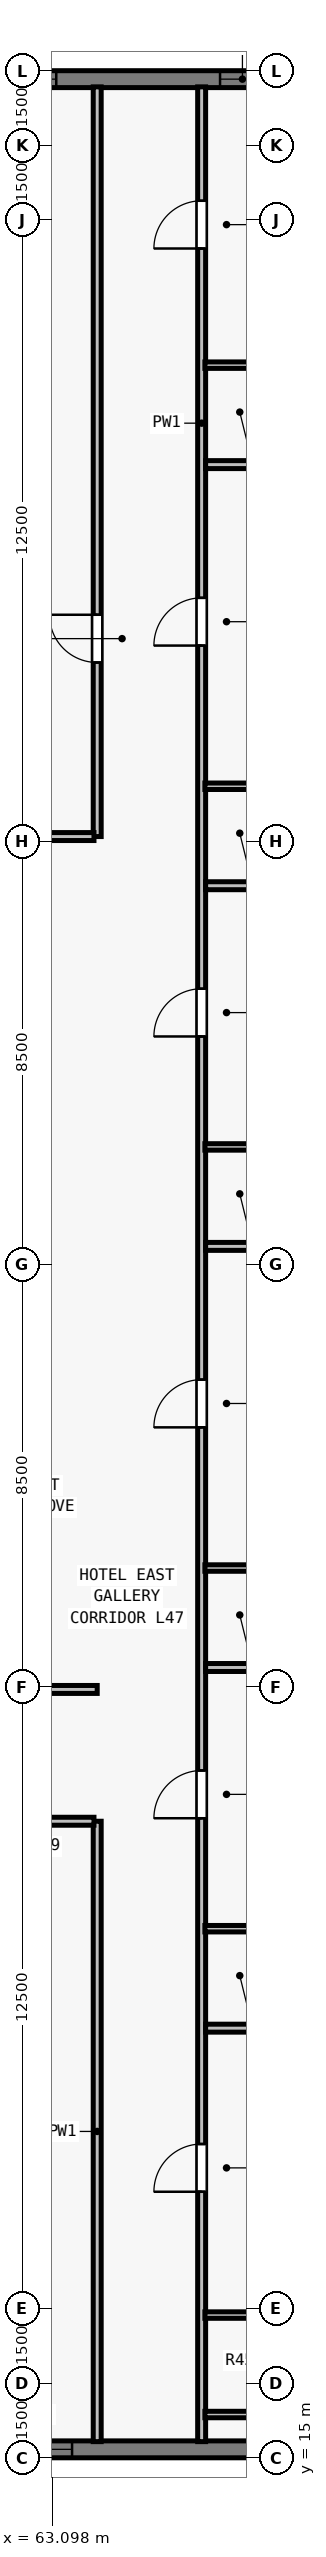
"""IFC4 building model, lengths in metres.
Left out: names, types, materials, properties, quantities, classifications, styles, units other than length and angle.
Written with IfcOpenShell. Run it as: python <this file> out.ifc"""

import sys

from ifc_helpers import new_model, si_unit, direction, frame, frame_2d, origin, place, context, subcontext, project, spatial, rectangle, extrude, element, fill, save


model = new_model("IFC4")
c1 = context("Model", 3, precision=1e-05, world=origin(), true_north=direction((0.0, 1.0)))
c2 = subcontext(c1, "Body", "Model", "MODEL_VIEW")
j1 = project(units=[si_unit("LENGTHUNIT", "METRE"), si_unit("PLANEANGLEUNIT", "RADIAN")], contexts=[c1])
p1 = place(None, origin())
s1 = spatial("IfcSite", under=j1, at=p1, CompositionType="ELEMENT")
p2 = place(p1, origin())
s2 = spatial("IfcBuilding", under=s1, at=p2, CompositionType="ELEMENT")
p3 = place(p2, frame((0.0, 0.0, 172.5)))
s3 = spatial("IfcBuildingStorey", under=s2, at=p3, CompositionType="ELEMENT", Elevation=172.5)
p4 = place(p3, frame((72.0, 15.17, 0.0), z_axis=(0.0, 0.0, 1.0), x_axis=(-1.0, 0.0, 0.0)))
e1 = element("IfcWall", 1, at=p4, inside=s3, PredefinedType="SOLIDWALL", context=c2, shape_type="SweptSolid", body=[
    extrude(rectangle(XDim=39.682, YDim=0.34, at=frame_2d((19.841, 0.0))), origin(), (0.0, 0.0, 1.0), 3.28),
])
p5 = place(p4, frame((8.505, 0.0, 0.8)))
e2 = element("IfcOpeningElement", 2, at=p5, cuts=e1, PredefinedType="OPENING", context=c2, shape_type="SweptSolid", body=[
    extrude(rectangle(XDim=1.35, YDim=1.66, at=frame_2d((0.675, 0.83))), frame((0.0, 0.18, 0.0), z_axis=(0.0, -1.0, 0.0), x_axis=(1.0, 0.0, 0.0)), (0.0, 0.0, 1.0), 0.36),
])
p6 = place(p4, frame((11.859, 0.0, 0.8)))
e3 = element("IfcOpeningElement", 3, at=p6, cuts=e1, PredefinedType="OPENING", context=c2, shape_type="SweptSolid", body=[
    extrude(rectangle(XDim=1.75, YDim=1.66, at=frame_2d((0.875, 0.83))), frame((0.0, 0.18, 0.0), z_axis=(0.0, -1.0, 0.0), x_axis=(1.0, 0.0, 0.0)), (0.0, 0.0, 1.0), 0.36),
])
p7 = place(p4, frame((16.062, 0.0, 0.8)))
e4 = element("IfcOpeningElement", 4, at=p7, cuts=e1, PredefinedType="OPENING", context=c2, shape_type="SweptSolid", body=[
    extrude(rectangle(XDim=1.35, YDim=1.66, at=frame_2d((0.675, 0.83))), frame((0.0, 0.18, 0.0), z_axis=(0.0, -1.0, 0.0), x_axis=(1.0, 0.0, 0.0)), (0.0, 0.0, 1.0), 0.36),
])
p8 = place(p4, frame((18.966, 0.0, 0.8)))
e5 = element("IfcOpeningElement", 5, at=p8, cuts=e1, PredefinedType="OPENING", context=c2, shape_type="SweptSolid", body=[
    extrude(rectangle(XDim=1.75, YDim=1.66, at=frame_2d((0.875, 0.83))), frame((0.0, 0.18, 0.0), z_axis=(0.0, -1.0, 0.0), x_axis=(1.0, 0.0, 0.0)), (0.0, 0.0, 1.0), 0.36),
])
p9 = place(p4, frame((21.469, 0.0, 0.8)))
e6 = element("IfcOpeningElement", 6, at=p9, cuts=e1, PredefinedType="OPENING", context=c2, shape_type="SweptSolid", body=[
    extrude(rectangle(XDim=1.35, YDim=1.66, at=frame_2d((0.675, 0.83))), frame((0.0, 0.18, 0.0), z_axis=(0.0, -1.0, 0.0), x_axis=(1.0, 0.0, 0.0)), (0.0, 0.0, 1.0), 0.36),
])
p10 = place(p4, frame((26.073, 0.0, 0.8)))
e7 = element("IfcOpeningElement", 7, at=p10, cuts=e1, PredefinedType="OPENING", context=c2, shape_type="SweptSolid", body=[
    extrude(rectangle(XDim=1.75, YDim=1.66, at=frame_2d((0.875, 0.83))), frame((0.0, 0.18, 0.0), z_axis=(0.0, -1.0, 0.0), x_axis=(1.0, 0.0, 0.0)), (0.0, 0.0, 1.0), 0.36),
])
p11 = place(p4, frame((32.71, 0.0, 0.8)))
e8 = element("IfcOpeningElement", 8, at=p11, cuts=e1, PredefinedType="OPENING", context=c2, shape_type="SweptSolid", body=[
    extrude(rectangle(XDim=0.9, YDim=1.66, at=frame_2d((0.45, 0.83))), frame((0.0, 0.18, 0.0), z_axis=(0.0, -1.0, 0.0), x_axis=(1.0, 0.0, 0.0)), (0.0, 0.0, 1.0), 0.36),
])
p12 = place(p3, frame((32.0, 62.83, 0.0), z_axis=(0.0, 0.0, 1.0), x_axis=(1.0, 0.0, 0.0)))
e9 = element("IfcWall", 9, at=p12, inside=s3, PredefinedType="SOLIDWALL", context=c2, shape_type="SweptSolid", body=[
    extrude(rectangle(XDim=39.682, YDim=0.34, at=frame_2d((19.841, 0.0))), origin(), (0.0, 0.0, 1.0), 3.28),
])
p13 = place(p12, frame((4.752, 0.0, 0.8)))
e10 = element("IfcOpeningElement", 10, at=p13, cuts=e9, PredefinedType="OPENING", context=c2, shape_type="SweptSolid", body=[
    extrude(rectangle(XDim=1.75, YDim=1.66, at=frame_2d((0.875, 0.83))), frame((0.0, 0.18, 0.0), z_axis=(0.0, -1.0, 0.0), x_axis=(1.0, 0.0, 0.0)), (0.0, 0.0, 1.0), 0.36),
])
p14 = place(p12, frame((8.055, 0.0, 0.8)))
e11 = element("IfcOpeningElement", 11, at=p14, cuts=e9, PredefinedType="OPENING", context=c2, shape_type="SweptSolid", body=[
    extrude(rectangle(XDim=1.35, YDim=1.66, at=frame_2d((0.675, 0.83))), frame((0.0, 0.18, 0.0), z_axis=(0.0, -1.0, 0.0), x_axis=(1.0, 0.0, 0.0)), (0.0, 0.0, 1.0), 0.36),
])
p15 = place(p12, frame((11.859, 0.0, 0.8)))
e12 = element("IfcOpeningElement", 12, at=p15, cuts=e9, PredefinedType="OPENING", context=c2, shape_type="SweptSolid", body=[
    extrude(rectangle(XDim=1.75, YDim=1.66, at=frame_2d((0.875, 0.83))), frame((0.0, 0.18, 0.0), z_axis=(0.0, -1.0, 0.0), x_axis=(1.0, 0.0, 0.0)), (0.0, 0.0, 1.0), 0.36),
])
p16 = place(p12, frame((18.966, 0.0, 0.8)))
e13 = element("IfcOpeningElement", 13, at=p16, cuts=e9, PredefinedType="OPENING", context=c2, shape_type="SweptSolid", body=[
    extrude(rectangle(XDim=1.75, YDim=1.66, at=frame_2d((0.875, 0.83))), frame((0.0, 0.18, 0.0), z_axis=(0.0, -1.0, 0.0), x_axis=(1.0, 0.0, 0.0)), (0.0, 0.0, 1.0), 0.36),
])
p17 = place(p12, frame((21.469, 0.0, 0.8)))
e14 = element("IfcOpeningElement", 14, at=p17, cuts=e9, PredefinedType="OPENING", context=c2, shape_type="SweptSolid", body=[
    extrude(rectangle(XDim=1.35, YDim=1.66, at=frame_2d((0.675, 0.83))), frame((0.0, 0.18, 0.0), z_axis=(0.0, -1.0, 0.0), x_axis=(1.0, 0.0, 0.0)), (0.0, 0.0, 1.0), 0.36),
])
p18 = place(p12, frame((26.073, 0.0, 0.8)))
e15 = element("IfcOpeningElement", 15, at=p18, cuts=e9, PredefinedType="OPENING", context=c2, shape_type="SweptSolid", body=[
    extrude(rectangle(XDim=1.75, YDim=1.66, at=frame_2d((0.875, 0.83))), frame((0.0, 0.18, 0.0), z_axis=(0.0, -1.0, 0.0), x_axis=(1.0, 0.0, 0.0)), (0.0, 0.0, 1.0), 0.36),
])
p19 = place(p12, frame((29.827, 0.0, 0.8)))
e16 = element("IfcOpeningElement", 16, at=p19, cuts=e9, PredefinedType="OPENING", context=c2, shape_type="SweptSolid", body=[
    extrude(rectangle(XDim=1.35, YDim=1.66, at=frame_2d((0.675, 0.83))), frame((0.0, 0.18, 0.0), z_axis=(0.0, -1.0, 0.0), x_axis=(1.0, 0.0, 0.0)), (0.0, 0.0, 1.0), 0.36),
])
p20 = place(p12, frame((34.47, 0.0, 0.8)))
e17 = element("IfcOpeningElement", 17, at=p20, cuts=e9, PredefinedType="OPENING", context=c2, shape_type="SweptSolid", body=[
    extrude(rectangle(XDim=0.9, YDim=1.66, at=frame_2d((0.45, 0.83))), frame((0.0, 0.18, 0.0), z_axis=(0.0, -1.0, 0.0), x_axis=(1.0, 0.0, 0.0)), (0.0, 0.0, 1.0), 0.36),
])
p21 = place(p3, frame((66.1, 15.325, 0.0), z_axis=(0.0, 0.0, 1.0), x_axis=(0.0, 1.0, 0.0)))
e18 = element("IfcWall", 18, at=p21, inside=s3, PredefinedType="PARTITIONING", context=c2, shape_type="SweptSolid", body=[
    extrude(rectangle(XDim=47.35, YDim=0.16, at=frame_2d((23.675, 0.0))), origin(), (0.0, 0.0, 1.0), 2.555),
])
p22 = place(p21, frame((5.025, 0.0, 0.0)))
e19 = element("IfcOpeningElement", 19, at=p22, cuts=e18, PredefinedType="OPENING", context=c2, shape_type="SweptSolid", body=[
    extrude(rectangle(XDim=0.96, YDim=2.15, at=frame_2d((0.48, 1.075))), frame((0.0, 0.09, 0.0), z_axis=(0.0, -1.0, 0.0), x_axis=(1.0, 0.0, 0.0)), (0.0, 0.0, 1.0), 0.18),
])
p23 = place(p21, frame((12.535, 0.0, 0.0)))
e20 = element("IfcOpeningElement", 20, at=p23, cuts=e18, PredefinedType="OPENING", context=c2, shape_type="SweptSolid", body=[
    extrude(rectangle(XDim=0.96, YDim=2.15, at=frame_2d((0.48, 1.075))), frame((0.0, 0.09, 0.0), z_axis=(0.0, -1.0, 0.0), x_axis=(1.0, 0.0, 0.0)), (0.0, 0.0, 1.0), 0.18),
])
p24 = place(p21, frame((20.395, 0.0, 0.0)))
e21 = element("IfcOpeningElement", 21, at=p24, cuts=e18, PredefinedType="OPENING", context=c2, shape_type="SweptSolid", body=[
    extrude(rectangle(XDim=0.96, YDim=2.15, at=frame_2d((0.48, 1.075))), frame((0.0, 0.09, 0.0), z_axis=(0.0, -1.0, 0.0), x_axis=(1.0, 0.0, 0.0)), (0.0, 0.0, 1.0), 0.18),
])
p25 = place(p21, frame((28.255, 0.0, 0.0)))
e22 = element("IfcOpeningElement", 22, at=p25, cuts=e18, PredefinedType="OPENING", context=c2, shape_type="SweptSolid", body=[
    extrude(rectangle(XDim=0.96, YDim=2.15, at=frame_2d((0.48, 1.075))), frame((0.0, 0.09, 0.0), z_axis=(0.0, -1.0, 0.0), x_axis=(1.0, 0.0, 0.0)), (0.0, 0.0, 1.0), 0.18),
])
p26 = place(p21, frame((36.115, 0.0, 0.0)))
e23 = element("IfcOpeningElement", 23, at=p26, cuts=e18, PredefinedType="OPENING", context=c2, shape_type="SweptSolid", body=[
    extrude(rectangle(XDim=0.96, YDim=2.15, at=frame_2d((0.48, 1.075))), frame((0.0, 0.09, 0.0), z_axis=(0.0, -1.0, 0.0), x_axis=(1.0, 0.0, 0.0)), (0.0, 0.0, 1.0), 0.18),
])
p27 = place(p21, frame((44.1, 0.0, 0.0)))
e24 = element("IfcOpeningElement", 24, at=p27, cuts=e18, PredefinedType="OPENING", context=c2, shape_type="SweptSolid", body=[
    extrude(rectangle(XDim=0.96, YDim=2.15, at=frame_2d((0.48, 1.075))), frame((0.0, 0.09, 0.0), z_axis=(0.0, -1.0, 0.0), x_axis=(1.0, 0.0, 0.0)), (0.0, 0.0, 1.0), 0.18),
])
p28 = place(p3, frame((64.0, 15.325, 0.0), z_axis=(0.0, 0.0, 1.0), x_axis=(0.0, 1.0, 0.0)))
e25 = element("IfcWall", 25, at=p28, inside=s3, PredefinedType="PARTITIONING", context=c2, shape_type="SweptSolid", body=[
    extrude(rectangle(XDim=12.475, YDim=0.16, at=frame_2d((6.238, 0.0))), origin(), (0.0, 0.0, 1.0), 2.555),
])
p29 = place(p3, frame((64.0, 47.6, 0.0), z_axis=(0.0, 0.0, 1.0), x_axis=(0.0, 1.0, 0.0)))
e26 = element("IfcWall", 26, at=p29, inside=s3, PredefinedType="PARTITIONING", context=c2, shape_type="SweptSolid", body=[
    extrude(rectangle(XDim=15.075, YDim=0.16, at=frame_2d((7.538, 0.0))), origin(), (0.0, 0.0, 1.0), 2.555),
])
p30 = place(p29, frame((3.5, 0.0, 0.0)))
e27 = element("IfcOpeningElement", 27, at=p30, cuts=e26, PredefinedType="OPENING", context=c2, shape_type="SweptSolid", body=[
    extrude(rectangle(XDim=0.96, YDim=2.12, at=frame_2d((0.48, 1.06))), frame((0.0, 0.09, 0.0), z_axis=(0.0, -1.0, 0.0), x_axis=(1.0, 0.0, 0.0)), (0.0, 0.0, 1.0), 0.18),
])
p31 = place(p3, frame((60.765, 30.45, 0.0), z_axis=(0.0, 0.0, 1.0), x_axis=(1.0, 0.0, 0.0)))
e28 = element("IfcWall", 28, at=p31, inside=s3, PredefinedType="PARTITIONING", context=c2, shape_type="SweptSolid", body=[
    extrude(rectangle(XDim=3.235, YDim=0.16, at=frame_2d((1.618, 0.0))), origin(), (0.0, 0.0, 1.0), 3.28),
])
p32 = place(p3, frame((60.765, 47.6, 0.0), z_axis=(0.0, 0.0, 1.0), x_axis=(1.0, 0.0, 0.0)))
e29 = element("IfcWall", 29, at=p32, inside=s3, PredefinedType="PARTITIONING", context=c2, shape_type="SweptSolid", body=[
    extrude(rectangle(XDim=3.17, YDim=0.16, at=frame_2d((1.585, 0.0))), origin(), (0.0, 0.0, 1.0), 3.28),
])
p33 = place(p3, frame((41.865, 27.8, 0.0), z_axis=(0.0, 0.0, 1.0), x_axis=(1.0, 0.0, 0.0)))
e30 = element("IfcWall", 30, at=p33, inside=s3, PredefinedType="PARTITIONING", context=c2, shape_type="SweptSolid", body=[
    extrude(rectangle(XDim=22.07, YDim=0.16, at=frame_2d((11.035, 0.0))), origin(), (0.0, 0.0, 1.0), 3.28),
])
p34 = place(p33, frame((4.232, 0.0, 0.0)))
e31 = element("IfcOpeningElement", 31, at=p34, cuts=e30, PredefinedType="OPENING", context=c2, shape_type="SweptSolid", body=[
    extrude(rectangle(XDim=0.96, YDim=2.15, at=frame_2d((0.48, 1.075))), frame((0.0, 0.09, 0.0), z_axis=(0.0, -1.0, 0.0), x_axis=(1.0, 0.0, 0.0)), (0.0, 0.0, 1.0), 0.18),
])
p35 = place(p33, frame((11.545, 0.0, 0.0)))
e32 = element("IfcOpeningElement", 32, at=p35, cuts=e30, PredefinedType="OPENING", context=c2, shape_type="SweptSolid", body=[
    extrude(rectangle(XDim=0.96, YDim=2.15, at=frame_2d((0.48, 1.075))), frame((0.0, 0.09, 0.0), z_axis=(0.0, -1.0, 0.0), x_axis=(1.0, 0.0, 0.0)), (0.0, 0.0, 1.0), 0.18),
])
p36 = place(p33, frame((19.168, 0.0, 0.0)))
e33 = element("IfcOpeningElement", 33, at=p36, cuts=e30, PredefinedType="OPENING", context=c2, shape_type="SweptSolid", body=[
    extrude(rectangle(XDim=0.96, YDim=2.15, at=frame_2d((0.48, 1.075))), frame((0.0, 0.09, 0.0), z_axis=(0.0, -1.0, 0.0), x_axis=(1.0, 0.0, 0.0)), (0.0, 0.0, 1.0), 0.18),
])
for number, where, z_axis, x_axis in (
    (34, (66.165, 15.87, 0.0), (0.0, 0.0, 1.0), (1.0, 0.0, 0.0)),
    (35, (66.165, 17.87, 0.0), (0.0, 0.0, 1.0), (1.0, 0.0, 0.0)),
):
    element("IfcWall", number, at=place(p3, frame(where, z_axis=z_axis, x_axis=x_axis)), inside=s3, PredefinedType="PLUMBINGWALL", context=c2, shape_type="SweptSolid", body=[
        extrude(rectangle(XDim=2.315, YDim=0.13, at=frame_2d((1.157, 0.0))), origin(), (0.0, 0.0, 1.0), 3.28),
    ])
p37 = place(p3, frame((66.18, 23.639, 0.0), z_axis=(0.0, 0.0, 1.0), x_axis=(1.0, 0.0, 0.0)))
e36 = element("IfcWall", 36, at=p37, inside=s3, PredefinedType="PARTITIONING", context=c2, shape_type="SweptSolid", body=[
    extrude(rectangle(XDim=9.495, YDim=0.16, at=frame_2d((4.748, 0.0))), origin(), (0.0, 0.0, 1.0), 2.896),
])
p38 = place(p3, frame((66.165, 25.639, 0.0), z_axis=(0.0, 0.0, 1.0), x_axis=(1.0, 0.0, 0.0)))
e37 = element("IfcWall", 37, at=p38, inside=s3, PredefinedType="PLUMBINGWALL", context=c2, shape_type="SweptSolid", body=[
    extrude(rectangle(XDim=2.315, YDim=0.13, at=frame_2d((1.157, 0.0))), origin(), (0.0, 0.0, 1.0), 2.896),
])
p39 = place(p3, frame((66.18, 30.891, 0.0), z_axis=(0.0, 0.0, 1.0), x_axis=(1.0, 0.0, 0.0)))
e38 = element("IfcWall", 38, at=p39, inside=s3, PredefinedType="PARTITIONING", context=c2, shape_type="SweptSolid", body=[
    extrude(rectangle(XDim=9.55, YDim=0.16, at=frame_2d((4.775, 0.0))), origin(), (0.0, 0.0, 1.0), 3.28),
])
p40 = place(p3, frame((66.165, 32.891, 0.0), z_axis=(0.0, 0.0, 1.0), x_axis=(1.0, 0.0, 0.0)))
e39 = element("IfcWall", 39, at=p40, inside=s3, PredefinedType="PLUMBINGWALL", context=c2, shape_type="SweptSolid", body=[
    extrude(rectangle(XDim=2.315, YDim=0.13, at=frame_2d((1.157, 0.0))), origin(), (0.0, 0.0, 1.0), 3.28),
])
p41 = place(p3, frame((66.18, 39.359, 0.0), z_axis=(0.0, 0.0, 1.0), x_axis=(1.0, 0.0, 0.0)))
e40 = element("IfcWall", 40, at=p41, inside=s3, PredefinedType="PARTITIONING", context=c2, shape_type="SweptSolid", body=[
    extrude(rectangle(XDim=9.495, YDim=0.16, at=frame_2d((4.748, 0.0))), origin(), (0.0, 0.0, 1.0), 3.28),
])
p42 = place(p3, frame((66.165, 41.359, 0.0), z_axis=(0.0, 0.0, 1.0), x_axis=(1.0, 0.0, 0.0)))
e41 = element("IfcWall", 41, at=p42, inside=s3, PredefinedType="PLUMBINGWALL", context=c2, shape_type="SweptSolid", body=[
    extrude(rectangle(XDim=2.315, YDim=0.13, at=frame_2d((1.157, 0.0))), origin(), (0.0, 0.0, 1.0), 3.28),
])
p43 = place(p3, frame((66.18, 46.611, 0.0), z_axis=(0.0, 0.0, 1.0), x_axis=(1.0, 0.0, 0.0)))
e42 = element("IfcWall", 42, at=p43, inside=s3, PredefinedType="PARTITIONING", context=c2, shape_type="SweptSolid", body=[
    extrude(rectangle(XDim=9.495, YDim=0.16, at=frame_2d((4.748, 0.0))), origin(), (0.0, 0.0, 1.0), 3.28),
])
p44 = place(p3, frame((66.165, 48.611, 0.0), z_axis=(0.0, 0.0, 1.0), x_axis=(1.0, 0.0, 0.0)))
e43 = element("IfcWall", 43, at=p44, inside=s3, PredefinedType="PLUMBINGWALL", context=c2, shape_type="SweptSolid", body=[
    extrude(rectangle(XDim=2.315, YDim=0.13, at=frame_2d((1.157, 0.0))), origin(), (0.0, 0.0, 1.0), 3.28),
])
p45 = place(p3, frame((66.18, 55.079, 0.0), z_axis=(0.0, 0.0, 1.0), x_axis=(1.0, 0.0, 0.0)))
e44 = element("IfcWall", 44, at=p45, inside=s3, PredefinedType="PARTITIONING", context=c2, shape_type="SweptSolid", body=[
    extrude(rectangle(XDim=9.495, YDim=0.16, at=frame_2d((4.748, 0.0))), origin(), (0.0, 0.0, 1.0), 2.896),
])
p46 = place(p3, frame((66.165, 57.079, 0.0), z_axis=(0.0, 0.0, 1.0), x_axis=(1.0, 0.0, 0.0)))
e45 = element("IfcWall", 45, at=p46, inside=s3, PredefinedType="PLUMBINGWALL", context=c2, shape_type="SweptSolid", body=[
    extrude(rectangle(XDim=2.315, YDim=0.13, at=frame_2d((1.157, 0.0))), origin(), (0.0, 0.0, 1.0), 3.28),
])
p47 = place(p5, origin())
e46 = element("IfcWindow", 46, at=p47, inside=s3, PartitioningType="SINGLE_PANEL", PredefinedType="WINDOW", context=c2, shape_type="SweptSolid", body=[
    extrude(rectangle(XDim=1.35, YDim=1.66, at=frame_2d((0.675, 0.83))), frame((0.0, -0.05, 0.0), z_axis=(0.0, -1.0, 0.0), x_axis=(1.0, 0.0, 0.0)), (0.0, 0.0, 1.0), 0.06),
])
fill(e2, e46)
p48 = place(p19, origin())
e47 = element("IfcWindow", 47, at=p48, inside=s3, PartitioningType="SINGLE_PANEL", PredefinedType="WINDOW", context=c2, shape_type="SweptSolid", body=[
    extrude(rectangle(XDim=1.35, YDim=1.66, at=frame_2d((0.675, 0.83))), frame((0.0, -0.05, 0.0), z_axis=(0.0, -1.0, 0.0), x_axis=(1.0, 0.0, 0.0)), (0.0, 0.0, 1.0), 0.06),
])
fill(e16, e47)
p49 = place(p20, origin())
e48 = element("IfcWindow", 48, at=p49, inside=s3, PartitioningType="SINGLE_PANEL", PredefinedType="WINDOW", context=c2, shape_type="SweptSolid", body=[
    extrude(rectangle(XDim=0.9, YDim=1.66, at=frame_2d((0.45, 0.83))), frame((0.0, -0.04, 0.0), z_axis=(0.0, -1.0, 0.0), x_axis=(1.0, 0.0, 0.0)), (0.0, 0.0, 1.0), 0.06),
])
fill(e17, e48)
p50 = place(p30, origin())
e49 = element("IfcDoor", 49, at=p50, inside=s3, OperationType="SINGLE_SWING_RIGHT", PredefinedType="DOOR", context=c2, shape_type="SweptSolid", body=[
    extrude(rectangle(XDim=0.96, YDim=2.12, at=frame_2d((0.48, 1.06))), frame((0.0, 0.025, 0.0), z_axis=(0.0, -1.0, 0.0), x_axis=(1.0, 0.0, 0.0)), (0.0, 0.0, 1.0), 0.05),
])
fill(e27, e49)
p51 = place(p22, origin())
e50 = element("IfcDoor", 50, at=p51, inside=s3, OperationType="SINGLE_SWING_LEFT", PredefinedType="DOOR", context=c2, shape_type="SweptSolid", body=[
    extrude(rectangle(XDim=0.96, YDim=2.15, at=frame_2d((0.48, 1.075))), frame((0.0, 0.025, 0.0), z_axis=(0.0, -1.0, 0.0), x_axis=(1.0, 0.0, 0.0)), (0.0, 0.0, 1.0), 0.05),
])
fill(e19, e50)
p52 = place(p23, origin())
e51 = element("IfcDoor", 51, at=p52, inside=s3, OperationType="SINGLE_SWING_LEFT", PredefinedType="DOOR", context=c2, shape_type="SweptSolid", body=[
    extrude(rectangle(XDim=0.96, YDim=2.15, at=frame_2d((0.48, 1.075))), frame((0.0, 0.025, 0.0), z_axis=(0.0, -1.0, 0.0), x_axis=(1.0, 0.0, 0.0)), (0.0, 0.0, 1.0), 0.05),
])
fill(e20, e51)
p53 = place(p24, origin())
e52 = element("IfcDoor", 52, at=p53, inside=s3, OperationType="SINGLE_SWING_LEFT", PredefinedType="DOOR", context=c2, shape_type="SweptSolid", body=[
    extrude(rectangle(XDim=0.96, YDim=2.15, at=frame_2d((0.48, 1.075))), frame((0.0, 0.025, 0.0), z_axis=(0.0, -1.0, 0.0), x_axis=(1.0, 0.0, 0.0)), (0.0, 0.0, 1.0), 0.05),
])
fill(e21, e52)
p54 = place(p25, origin())
e53 = element("IfcDoor", 53, at=p54, inside=s3, OperationType="SINGLE_SWING_LEFT", PredefinedType="DOOR", context=c2, shape_type="SweptSolid", body=[
    extrude(rectangle(XDim=0.96, YDim=2.15, at=frame_2d((0.48, 1.075))), frame((0.0, 0.025, 0.0), z_axis=(0.0, -1.0, 0.0), x_axis=(1.0, 0.0, 0.0)), (0.0, 0.0, 1.0), 0.05),
])
fill(e22, e53)
p55 = place(p26, origin())
e54 = element("IfcDoor", 54, at=p55, inside=s3, OperationType="SINGLE_SWING_LEFT", PredefinedType="DOOR", context=c2, shape_type="SweptSolid", body=[
    extrude(rectangle(XDim=0.96, YDim=2.15, at=frame_2d((0.48, 1.075))), frame((0.0, 0.025, 0.0), z_axis=(0.0, -1.0, 0.0), x_axis=(1.0, 0.0, 0.0)), (0.0, 0.0, 1.0), 0.05),
])
fill(e23, e54)
p56 = place(p27, origin())
e55 = element("IfcDoor", 55, at=p56, inside=s3, OperationType="SINGLE_SWING_LEFT", PredefinedType="DOOR", context=c2, shape_type="SweptSolid", body=[
    extrude(rectangle(XDim=0.96, YDim=2.15, at=frame_2d((0.48, 1.075))), frame((0.0, 0.025, 0.0), z_axis=(0.0, -1.0, 0.0), x_axis=(1.0, 0.0, 0.0)), (0.0, 0.0, 1.0), 0.05),
])
fill(e24, e55)
save(model, sys.argv[1])
